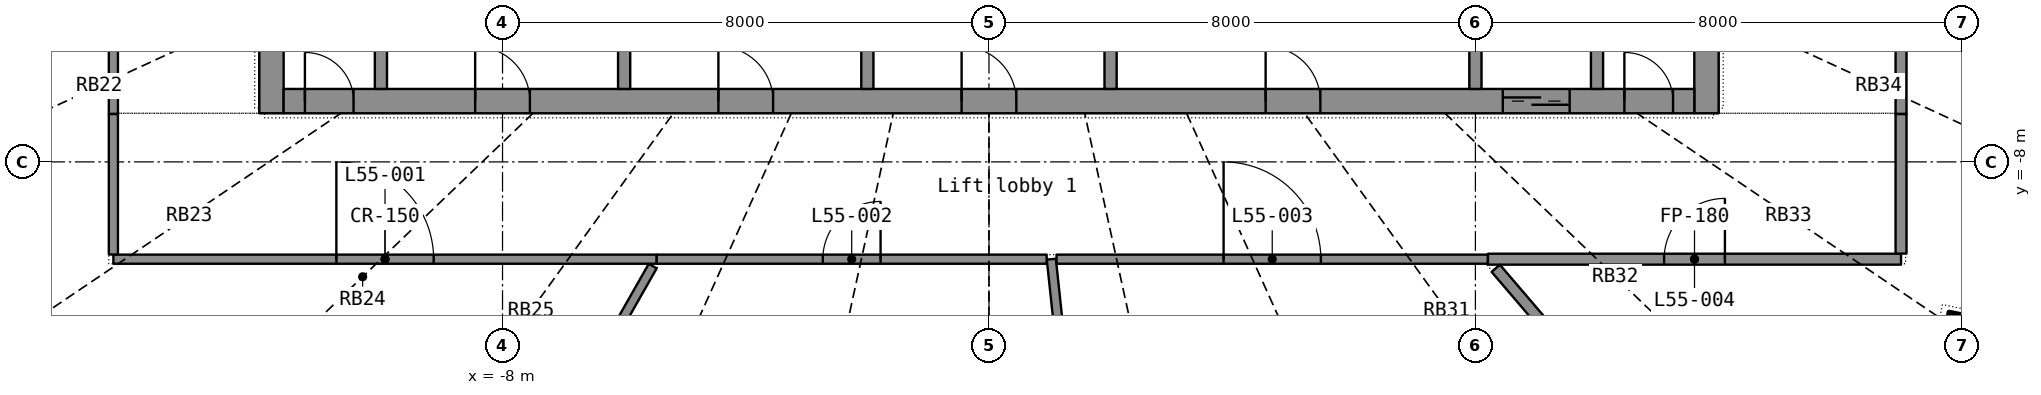
"""IFC4 building model, lengths in metres.
Left out: names, types, materials, properties, quantities, classifications, styles, units other than length and angle.
Written with IfcOpenShell. Run it as: python <this file> out.ifc"""

import sys

from ifc_helpers import new_model, si_unit, direction, frame, frame_2d, origin, origin_2d, place, context, subcontext, project, spatial, rectangle, hollow_rectangle, extrude, element, fill, save


model = new_model("IFC4")
c1 = context("Model", 3, precision=1e-05, world=origin(), true_north=direction((0.0, 1.0)))
c2 = subcontext(c1, "Body", "Model", "MODEL_VIEW")
j1 = project(units=[si_unit("LENGTHUNIT", "METRE"), si_unit("PLANEANGLEUNIT", "RADIAN")], contexts=[c1])
p1 = place(None, origin())
s1 = spatial("IfcSite", under=j1, at=p1, CompositionType="ELEMENT")
p2 = place(p1, origin())
s2 = spatial("IfcBuilding", under=s1, at=p2, CompositionType="ELEMENT")
p3 = place(p2, frame((0.0, 0.0, 228.2)))
s3 = spatial("IfcBuildingStorey", under=s2, at=p3, CompositionType="ELEMENT", Elevation=228.2)
p4 = place(p3, frame((16.021, -10.823, 0.0), z_axis=(-0.026512179, 0.018202391, 0.999482755), x_axis=(-0.720721695, -0.693194109, -0.006493471)))
e1 = element("IfcColumn", 1, at=p4, inside=s3, PredefinedType="COLUMN", context=c2, shape_type="SweptSolid", body=[
    extrude(hollow_rectangle(XDim=0.6, YDim=0.6, WallThickness=0.025, at=origin_2d()), origin(), (0.0, 0.0, 1.0), 3.702),
])
p5 = place(p3, frame((-11.8, -7.2, 0.0), z_axis=(0.0, 0.0, 1.0), x_axis=(0.0, 1.0, 0.0)))
e2 = element("IfcWall", 2, at=p5, inside=s3, PredefinedType="SHEAR", context=c2, shape_type="SweptSolid", body=[
    extrude(rectangle(XDim=14.4, YDim=0.4, at=frame_2d((7.2, 0.0))), origin(), (0.0, 0.0, 1.0), 3.3),
])
p6 = place(p5, frame((6.5, 0.0, 0.0)))
e3 = element("IfcOpeningElement", 3, at=p6, cuts=e2, PredefinedType="OPENING", context=c2, shape_type="SweptSolid", body=[
    extrude(rectangle(XDim=1.4, YDim=2.2, at=frame_2d((0.7, 1.1))), frame((0.0, 0.21, 0.0), z_axis=(0.0, -1.0, 0.0), x_axis=(1.0, 0.0, 0.0)), (0.0, 0.0, 1.0), 0.42),
])
p7 = place(p3, frame((11.8, -7.2, 0.0), z_axis=(0.0, 0.0, 1.0), x_axis=(0.0, 1.0, 0.0)))
e4 = element("IfcWall", 4, at=p7, inside=s3, PredefinedType="SHEAR", context=c2, shape_type="SweptSolid", body=[
    extrude(rectangle(XDim=14.4, YDim=0.4, at=frame_2d((7.2, 0.0))), origin(), (0.0, 0.0, 1.0), 3.3),
])
p8 = place(p7, frame((6.5, 0.0, 0.0)))
e5 = element("IfcOpeningElement", 5, at=p8, cuts=e4, PredefinedType="OPENING", context=c2, shape_type="SweptSolid", body=[
    extrude(rectangle(XDim=1.4, YDim=2.2, at=frame_2d((0.7, 1.1))), frame((0.0, 0.21, 0.0), z_axis=(0.0, -1.0, 0.0), x_axis=(1.0, 0.0, 0.0)), (0.0, 0.0, 1.0), 0.42),
])
p9 = place(p3, frame((-11.6, -7.0, 0.0), z_axis=(0.0, 0.0, 1.0), x_axis=(1.0, 0.0, 0.0)))
e6 = element("IfcWall", 6, at=p9, inside=s3, PredefinedType="SHEAR", context=c2, shape_type="SweptSolid", body=[
    extrude(rectangle(XDim=23.2, YDim=0.4, at=frame_2d((11.6, 0.0))), origin(), (0.0, 0.0, 1.0), 3.3),
])
p10 = place(p9, frame((20.05, 0.0, 0.0)))
e7 = element("IfcOpeningElement", 7, at=p10, cuts=e6, PredefinedType="OPENING", context=c2, shape_type="SweptSolid", body=[
    extrude(rectangle(XDim=1.1, YDim=2.2, at=frame_2d((0.55, 1.1))), frame((0.0, 0.21, 0.0), z_axis=(0.0, -1.0, 0.0), x_axis=(1.0, 0.0, 0.0)), (0.0, 0.0, 1.0), 0.42),
])
p11 = place(p9, frame((3.15, 0.0, 0.0)))
e8 = element("IfcOpeningElement", 8, at=p11, cuts=e6, PredefinedType="OPENING", context=c2, shape_type="SweptSolid", body=[
    extrude(rectangle(XDim=0.9, YDim=2.1, at=frame_2d((0.45, 1.05))), frame((0.0, 0.21, 0.0), z_axis=(0.0, -1.0, 0.0), x_axis=(1.0, 0.0, 0.0)), (0.0, 0.0, 1.0), 0.42),
])
p12 = place(p9, frame((7.15, 0.0, 0.0)))
e9 = element("IfcOpeningElement", 9, at=p12, cuts=e6, PredefinedType="OPENING", context=c2, shape_type="SweptSolid", body=[
    extrude(rectangle(XDim=0.9, YDim=2.1, at=frame_2d((0.45, 1.05))), frame((0.0, 0.21, 0.0), z_axis=(0.0, -1.0, 0.0), x_axis=(1.0, 0.0, 0.0)), (0.0, 0.0, 1.0), 0.42),
])
p13 = place(p9, frame((11.15, 0.0, 0.0)))
e10 = element("IfcOpeningElement", 10, at=p13, cuts=e6, PredefinedType="OPENING", context=c2, shape_type="SweptSolid", body=[
    extrude(rectangle(XDim=0.9, YDim=2.1, at=frame_2d((0.45, 1.05))), frame((0.0, 0.21, 0.0), z_axis=(0.0, -1.0, 0.0), x_axis=(1.0, 0.0, 0.0)), (0.0, 0.0, 1.0), 0.42),
])
p14 = place(p9, frame((16.15, 0.0, 0.0)))
e11 = element("IfcOpeningElement", 11, at=p14, cuts=e6, PredefinedType="OPENING", context=c2, shape_type="SweptSolid", body=[
    extrude(rectangle(XDim=0.9, YDim=2.1, at=frame_2d((0.45, 1.05))), frame((0.0, 0.21, 0.0), z_axis=(0.0, -1.0, 0.0), x_axis=(1.0, 0.0, 0.0)), (0.0, 0.0, 1.0), 0.42),
])
p15 = place(p9, frame((0.35, 0.0, 0.0)))
e12 = element("IfcOpeningElement", 12, at=p15, cuts=e6, PredefinedType="OPENING", context=c2, shape_type="SweptSolid", body=[
    extrude(rectangle(XDim=0.8, YDim=2.05, at=frame_2d((0.4, 1.025))), frame((0.0, 0.21, 0.0), z_axis=(0.0, -1.0, 0.0), x_axis=(1.0, 0.0, 0.0)), (0.0, 0.0, 1.0), 0.42),
])
p16 = place(p9, frame((22.05, 0.0, 0.0)))
e13 = element("IfcOpeningElement", 13, at=p16, cuts=e6, PredefinedType="OPENING", context=c2, shape_type="SweptSolid", body=[
    extrude(rectangle(XDim=0.8, YDim=2.05, at=frame_2d((0.4, 1.025))), frame((0.0, 0.21, 0.0), z_axis=(0.0, -1.0, 0.0), x_axis=(1.0, 0.0, 0.0)), (0.0, 0.0, 1.0), 0.42),
])
for number, where, z_axis, x_axis in (
    (14, (-10.0, -6.8, 0.0), (0.0, 0.0, 1.0), (0.0, 1.0, 0.0)),
    (15, (8.0, -6.8, 0.0), (0.0, 0.0, 1.0), (0.0, 1.0, 0.0)),
    (16, (10.0, -6.8, 0.0), (0.0, 0.0, 1.0), (0.0, 1.0, 0.0)),
):
    element("IfcWall", number, at=place(p3, frame(where, z_axis=z_axis, x_axis=x_axis)), inside=s3, PredefinedType="SHEAR", context=c2, shape_type="SweptSolid", body=[
        extrude(rectangle(XDim=2.9, YDim=0.2, at=frame_2d((1.45, 0.0))), origin(), (0.0, 0.0, 1.0), 3.3),
    ])
for number, where, z_axis, x_axis in (
    (17, (-6.0, -6.8, 0.0), (0.0, 0.0, 1.0), (0.0, 1.0, 0.0)),
    (18, (-2.0, -6.8, 0.0), (0.0, 0.0, 1.0), (0.0, 1.0, 0.0)),
    (19, (2.0, -6.8, 0.0), (0.0, 0.0, 1.0), (0.0, 1.0, 0.0)),
):
    element("IfcWall", number, at=place(p3, frame(where, z_axis=z_axis, x_axis=x_axis)), inside=s3, PredefinedType="PARTITIONING", context=c2, shape_type="SweptSolid", body=[
        extrude(rectangle(XDim=2.9, YDim=0.2, at=frame_2d((1.45, 0.0))), origin(), (0.0, 0.0, 1.0), 3.3),
    ])
p17 = place(p3, frame((-14.4, -9.6, 0.0), z_axis=(0.0, 0.0, 1.0), x_axis=(1.0, 0.0, 0.0)))
e20 = element("IfcWall", 20, at=p17, inside=s3, PredefinedType="PARTITIONING", context=c2, shape_type="SweptSolid", body=[
    extrude(rectangle(XDim=8.935, YDim=0.15, at=frame_2d((4.467, 0.0))), origin(), (0.0, 0.0, 1.0), 2.4),
])
p18 = place(p17, frame((3.667, 0.0, 0.0)))
e21 = element("IfcOpeningElement", 21, at=p18, cuts=e20, PredefinedType="OPENING", context=c2, shape_type="SweptSolid", body=[
    extrude(rectangle(XDim=1.6, YDim=2.4, at=frame_2d((0.8, 1.2))), frame((0.0, 0.085, 0.0), z_axis=(0.0, -1.0, 0.0), x_axis=(1.0, 0.0, 0.0)), (0.0, 0.0, 1.0), 0.17),
])
p19 = place(p3, frame((1.857, -17.385, 0.0), z_axis=(0.0, 0.0, 1.0), x_axis=(-0.106203924, 0.99434437, 0.0)))
e22 = element("IfcWall", 22, at=p19, inside=s3, PredefinedType="PARTITIONING", context=c2, shape_type="SweptSolid", body=[
    extrude(rectangle(XDim=7.83, YDim=0.15, at=frame_2d((3.915, 0.0))), origin(), (0.0, 0.0, 1.0), 2.4),
])
p20 = place(p3, frame((1.111, -9.6, 0.0), z_axis=(0.0, 0.0, 1.0), x_axis=(1.0, 0.0, 0.0)))
e23 = element("IfcWall", 23, at=p20, inside=s3, PredefinedType="PARTITIONING", context=c2, shape_type="SweptSolid", body=[
    extrude(rectangle(XDim=7.096, YDim=0.15, at=frame_2d((3.548, 0.0))), origin(), (0.0, 0.0, 1.0), 2.4),
])
p21 = place(p20, frame((2.748, 0.0, 0.0)))
e24 = element("IfcOpeningElement", 24, at=p21, cuts=e23, PredefinedType="OPENING", context=c2, shape_type="SweptSolid", body=[
    extrude(rectangle(XDim=1.6, YDim=2.4, at=frame_2d((0.8, 1.2))), frame((0.0, 0.085, 0.0), z_axis=(0.0, -1.0, 0.0), x_axis=(1.0, 0.0, 0.0)), (0.0, 0.0, 1.0), 0.17),
])
p22 = place(p3, frame((-9.006, -15.819, 0.0), z_axis=(0.0, 0.0, 1.0), x_axis=(0.494757339, 0.869031171, 0.0)))
e25 = element("IfcWall", 25, at=p22, inside=s3, PredefinedType="PARTITIONING", context=c2, shape_type="SweptSolid", body=[
    extrude(rectangle(XDim=7.025, YDim=0.15, at=frame_2d((3.513, 0.0))), origin(), (0.0, 0.0, 1.0), 2.4),
])
p23 = place(p3, frame((8.207, -9.6, 0.0), z_axis=(0.0, 0.0, 1.0), x_axis=(1.0, 0.0, 0.0)))
e26 = element("IfcWall", 26, at=p23, inside=s3, PredefinedType="PARTITIONING", context=c2, shape_type="SweptSolid", body=[
    extrude(rectangle(XDim=6.793, YDim=0.18, at=frame_2d((3.397, 0.0))), origin(), (0.0, 0.0, 1.0), 2.4),
])
p24 = place(p23, frame((2.897, 0.0, 0.0)))
e27 = element("IfcOpeningElement", 27, at=p24, cuts=e26, PredefinedType="OPENING", context=c2, shape_type="SweptSolid", body=[
    extrude(rectangle(XDim=1.0, YDim=2.1, at=frame_2d((0.5, 1.05))), frame((0.0, 0.1, 0.0), z_axis=(0.0, -1.0, 0.0), x_axis=(1.0, 0.0, 0.0)), (0.0, 0.0, 1.0), 0.2),
])
p25 = place(p3, frame((-5.464, -9.6, 0.0), z_axis=(0.0, 0.0, 1.0), x_axis=(1.0, 0.0, 0.0)))
e28 = element("IfcWall", 28, at=p25, inside=s3, PredefinedType="PARTITIONING", context=c2, shape_type="SweptSolid", body=[
    extrude(rectangle(XDim=6.413, YDim=0.15, at=frame_2d((3.207, 0.0))), origin(), (0.0, 0.0, 1.0), 2.4),
])
p26 = place(p25, frame((2.731, 0.0, 0.0)))
e29 = element("IfcOpeningElement", 29, at=p26, cuts=e28, PredefinedType="OPENING", context=c2, shape_type="SweptSolid", body=[
    extrude(rectangle(XDim=0.95, YDim=2.15, at=frame_2d((0.475, 1.075))), frame((0.0, 0.085, 0.0), z_axis=(0.0, -1.0, 0.0), x_axis=(1.0, 0.0, 0.0)), (0.0, 0.0, 1.0), 0.17),
])
p27 = place(p3, frame((12.226, -14.302, 0.0), z_axis=(0.0, 0.0, 1.0), x_axis=(-0.649766711, 0.760133686, 0.0)))
e30 = element("IfcWall", 30, at=p27, inside=s3, PredefinedType="PARTITIONING", context=c2, shape_type="SweptSolid", body=[
    extrude(rectangle(XDim=5.988, YDim=0.18, at=frame_2d((2.994, 0.0))), origin(), (0.0, 0.0, 1.0), 2.4),
])
p28 = place(p3, frame((15.0, -7.212, 0.0), z_axis=(0.0, 0.0, 1.0), x_axis=(0.0, 1.0, 0.0)))
e31 = element("IfcWall", 31, at=p28, inside=s3, PredefinedType="PARTITIONING", context=c2, shape_type="SweptSolid", body=[
    extrude(rectangle(XDim=5.712, YDim=0.18, at=frame_2d((2.856, 0.0))), origin(), (0.0, 0.0, 1.0), 2.4),
])
p29 = place(p3, frame((-14.4, -3.256, 0.0), z_axis=(0.0, 0.0, 1.0), x_axis=(0.0, -1.0, 0.0)))
e32 = element("IfcWall", 32, at=p29, inside=s3, PredefinedType="PARTITIONING", context=c2, shape_type="SweptSolid", body=[
    extrude(rectangle(XDim=3.956, YDim=0.15, at=frame_2d((1.978, 0.0))), origin(), (0.0, 0.0, 1.0), 2.4),
])
p30 = place(p3, frame((-14.4, -7.213, 0.0), z_axis=(0.0, 0.0, 1.0), x_axis=(0.0, -1.0, 0.0)))
e33 = element("IfcWall", 33, at=p30, inside=s3, PredefinedType="PARTITIONING", context=c2, shape_type="SweptSolid", body=[
    extrude(rectangle(XDim=2.31, YDim=0.15, at=frame_2d((1.155, 0.0))), origin(), (0.0, 0.0, 1.0), 2.4),
])
p31 = place(p3, frame((15.0, -9.508, 0.0), z_axis=(0.0, 0.0, 1.0), x_axis=(0.0, 1.0, 0.0)))
e34 = element("IfcWall", 34, at=p31, inside=s3, PredefinedType="PARTITIONING", context=c2, shape_type="SweptSolid", body=[
    extrude(rectangle(XDim=2.295, YDim=0.18, at=frame_2d((1.147, 0.0))), origin(), (0.0, 0.0, 1.0), 2.4),
])
p32 = place(p10, origin())
e35 = element("IfcDoor", 35, at=p32, inside=s3, OperationType="DOUBLE_DOOR_SLIDING", PredefinedType="DOOR", context=c2, shape_type="SweptSolid", body=[
    extrude(rectangle(XDim=1.1, YDim=2.2, at=frame_2d((0.55, 1.1))), frame((0.0, 0.025, 0.0), z_axis=(0.0, -1.0, 0.0), x_axis=(1.0, 0.0, 0.0)), (0.0, 0.0, 1.0), 0.05),
])
fill(e7, e35)
p33 = place(p11, origin())
e36 = element("IfcDoor", 36, at=p33, inside=s3, OperationType="SINGLE_SWING_LEFT", PredefinedType="DOOR", context=c2, shape_type="SweptSolid", body=[
    extrude(rectangle(XDim=0.9, YDim=2.1, at=frame_2d((0.45, 1.05))), frame((0.0, 0.025, 0.0), z_axis=(0.0, -1.0, 0.0), x_axis=(1.0, 0.0, 0.0)), (0.0, 0.0, 1.0), 0.05),
])
fill(e8, e36)
p34 = place(p12, origin())
e37 = element("IfcDoor", 37, at=p34, inside=s3, OperationType="SINGLE_SWING_LEFT", PredefinedType="DOOR", context=c2, shape_type="SweptSolid", body=[
    extrude(rectangle(XDim=0.9, YDim=2.1, at=frame_2d((0.45, 1.05))), frame((0.0, 0.025, 0.0), z_axis=(0.0, -1.0, 0.0), x_axis=(1.0, 0.0, 0.0)), (0.0, 0.0, 1.0), 0.05),
])
fill(e9, e37)
p35 = place(p13, origin())
e38 = element("IfcDoor", 38, at=p35, inside=s3, OperationType="SINGLE_SWING_LEFT", PredefinedType="DOOR", context=c2, shape_type="SweptSolid", body=[
    extrude(rectangle(XDim=0.9, YDim=2.1, at=frame_2d((0.45, 1.05))), frame((0.0, 0.025, 0.0), z_axis=(0.0, -1.0, 0.0), x_axis=(1.0, 0.0, 0.0)), (0.0, 0.0, 1.0), 0.05),
])
fill(e10, e38)
p36 = place(p14, origin())
e39 = element("IfcDoor", 39, at=p36, inside=s3, OperationType="SINGLE_SWING_LEFT", PredefinedType="DOOR", context=c2, shape_type="SweptSolid", body=[
    extrude(rectangle(XDim=0.9, YDim=2.1, at=frame_2d((0.45, 1.05))), frame((0.0, 0.025, 0.0), z_axis=(0.0, -1.0, 0.0), x_axis=(1.0, 0.0, 0.0)), (0.0, 0.0, 1.0), 0.05),
])
fill(e11, e39)
p37 = place(p15, origin())
e40 = element("IfcDoor", 40, at=p37, inside=s3, OperationType="SINGLE_SWING_LEFT", PredefinedType="DOOR", context=c2, shape_type="SweptSolid", body=[
    extrude(rectangle(XDim=0.8, YDim=2.05, at=frame_2d((0.4, 1.025))), frame((0.0, 0.025, 0.0), z_axis=(0.0, -1.0, 0.0), x_axis=(1.0, 0.0, 0.0)), (0.0, 0.0, 1.0), 0.05),
])
fill(e12, e40)
p38 = place(p16, origin())
e41 = element("IfcDoor", 41, at=p38, inside=s3, OperationType="SINGLE_SWING_LEFT", PredefinedType="DOOR", context=c2, shape_type="SweptSolid", body=[
    extrude(rectangle(XDim=0.8, YDim=2.05, at=frame_2d((0.4, 1.025))), frame((0.0, 0.025, 0.0), z_axis=(0.0, -1.0, 0.0), x_axis=(1.0, 0.0, 0.0)), (0.0, 0.0, 1.0), 0.05),
])
fill(e13, e41)
p39 = place(p18, origin())
e42 = element("IfcDoor", 42, at=p39, inside=s3, OperationType="DOUBLE_DOOR_SINGLE_SWING", PredefinedType="DOOR", context=c2, shape_type="SweptSolid", body=[
    extrude(rectangle(XDim=1.6, YDim=2.4, at=frame_2d((0.8, 1.2))), frame((0.0, 0.025, 0.0), z_axis=(0.0, -1.0, 0.0), x_axis=(1.0, 0.0, 0.0)), (0.0, 0.0, 1.0), 0.05),
])
fill(e21, e42)
p40 = place(p26, origin())
e43 = element("IfcDoor", 43, at=p40, inside=s3, OperationType="SINGLE_SWING_RIGHT", PredefinedType="DOOR", context=c2, shape_type="SweptSolid", body=[
    extrude(rectangle(XDim=0.95, YDim=2.15, at=frame_2d((0.475, 1.075))), frame((0.0, 0.025, 0.0), z_axis=(0.0, -1.0, 0.0), x_axis=(1.0, 0.0, 0.0)), (0.0, 0.0, 1.0), 0.05),
])
fill(e29, e43)
p41 = place(p21, origin())
e44 = element("IfcDoor", 44, at=p41, inside=s3, OperationType="DOUBLE_DOOR_SINGLE_SWING", PredefinedType="DOOR", context=c2, shape_type="SweptSolid", body=[
    extrude(rectangle(XDim=1.6, YDim=2.4, at=frame_2d((0.8, 1.2))), frame((0.0, 0.025, 0.0), z_axis=(0.0, -1.0, 0.0), x_axis=(1.0, 0.0, 0.0)), (0.0, 0.0, 1.0), 0.05),
])
fill(e24, e44)
p42 = place(p24, origin())
e45 = element("IfcDoor", 45, at=p42, inside=s3, OperationType="SINGLE_SWING_RIGHT", PredefinedType="DOOR", context=c2, shape_type="SweptSolid", body=[
    extrude(rectangle(XDim=1.0, YDim=2.1, at=frame_2d((0.5, 1.05))), frame((0.0, 0.025, 0.0), z_axis=(0.0, -1.0, 0.0), x_axis=(1.0, 0.0, 0.0)), (0.0, 0.0, 1.0), 0.05),
])
fill(e27, e45)
save(model, sys.argv[1])
